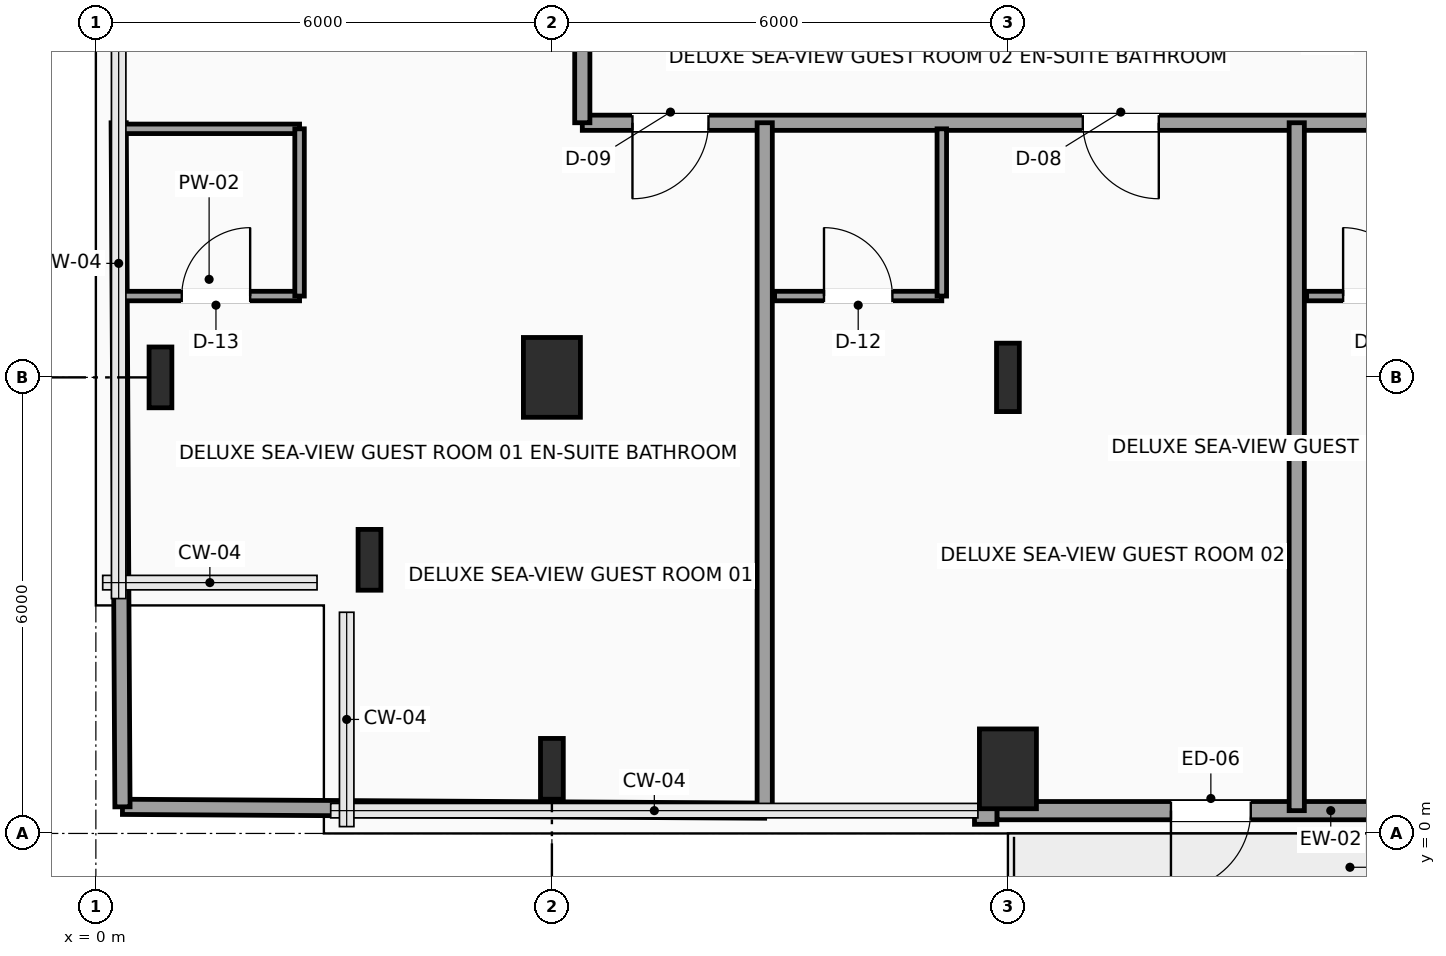
"""IFC4 building model, lengths in metres.
Left out: names, types, materials, properties, quantities, classifications, styles, units other than length and angle.
Written with IfcOpenShell. Run it as: python <this file> out.ifc"""

import sys

from ifc_helpers import new_model, si_unit, direction, frame, frame_2d, origin, origin_2d, place, context, subcontext, project, spatial, rectangle, i_section, extrude, element, fill, save


model = new_model("IFC4")
c1 = context("Model", 3, precision=1e-05, world=origin(), true_north=direction((0.0, 1.0)))
c2 = subcontext(c1, "Body", "Model", "MODEL_VIEW")
j1 = project(units=[si_unit("LENGTHUNIT", "METRE"), si_unit("PLANEANGLEUNIT", "RADIAN")], contexts=[c1])
p1 = place(None, origin())
s1 = spatial("IfcSite", under=j1, at=p1, CompositionType="ELEMENT")
p2 = place(p1, origin())
s2 = spatial("IfcBuilding", under=s1, at=p2, CompositionType="ELEMENT")
p3 = place(p2, frame((0.0, 0.0, 172.95)))
s3 = spatial("IfcBuildingStorey", under=s2, at=p3, CompositionType="ELEMENT", Elevation=172.95)
for number, where, z_axis, x_axis in (
    (1, (3.6, 3.6, 0.0), (0.0, 0.0, 1.0), (1.0, 0.0, 0.0)),
    (2, (0.85, 6.0, 0.0), (0.0, 0.0, 1.0), (1.0, 0.0, 0.0)),
    (3, (6.0, 0.85, 0.0), (0.0, 0.0, 1.0), (1.0, 0.0, 0.0)),
):
    element("IfcColumn", number, at=place(p3, frame(where, z_axis=z_axis, x_axis=x_axis)), inside=s3, PredefinedType="COLUMN", context=c2, shape_type="SweptSolid", body=[
        extrude(i_section(OverallWidth=0.3, OverallDepth=0.8, WebThickness=0.018, FlangeThickness=0.033, FilletRadius=0.03, at=origin_2d()), origin(), (0.0, 0.0, 1.0), 3.75),
    ])
for number, where, z_axis, x_axis in (
    (4, (6.0, 6.0, 0.0), (0.0, 0.0, 1.0), (1.0, 0.0, 0.0)),
    (5, (12.0, 0.85, 0.0), (0.0, 0.0, 1.0), (1.0, 0.0, 0.0)),
):
    element("IfcColumn", number, at=place(p3, frame(where, z_axis=z_axis, x_axis=x_axis)), inside=s3, PredefinedType="COLUMN", context=c2, shape_type="SweptSolid", body=[
        extrude(rectangle(XDim=0.75, YDim=1.05, at=origin_2d()), origin(), (0.0, 0.0, 1.0), 3.75),
    ])
p4 = place(p3, frame((12.0, 6.0, 0.0), z_axis=(0.0, 0.0, 1.0), x_axis=(1.0, 0.0, 0.0)))
e6 = element("IfcColumn", 6, at=p4, inside=s3, PredefinedType="COLUMN", context=c2, shape_type="SweptSolid", body=[
    extrude(i_section(OverallWidth=0.3, OverallDepth=0.9, WebThickness=0.019, FlangeThickness=0.035, FilletRadius=0.03, at=origin_2d()), origin(), (0.0, 0.0, 1.0), 3.75),
])
p5 = place(p3, frame((21.145, 0.3, 0.0), z_axis=(0.0, 0.0, 1.0), x_axis=(-1.0, 0.0, 0.0)))
e7 = element("IfcWall", 7, at=p5, inside=s3, PredefinedType="SOLIDWALL", context=c2, shape_type="SweptSolid", body=[
    extrude(rectangle(XDim=9.29, YDim=0.24, at=frame_2d((4.645, 0.0))), origin(), (0.0, 0.0, 1.0), 3.54),
])
p6 = place(p5, frame((5.95, 0.0, 0.0)))
e8 = element("IfcOpeningElement", 8, at=p6, cuts=e7, PredefinedType="OPENING", context=c2, shape_type="SweptSolid", body=[
    extrude(rectangle(XDim=1.05, YDim=2.2, at=frame_2d((0.525, 1.1))), frame((0.0, 0.13, 0.0), z_axis=(0.0, -1.0, 0.0), x_axis=(1.0, 0.0, 0.0)), (0.0, 0.0, 1.0), 0.26),
])
p7 = place(p5, frame((0.35, 0.0, 0.85)))
e9 = element("IfcOpeningElement", 9, at=p7, cuts=e7, PredefinedType="OPENING", context=c2, shape_type="SweptSolid", body=[
    extrude(rectangle(XDim=2.1, YDim=2.2, at=frame_2d((1.05, 1.1))), frame((0.0, 0.13, 0.0), z_axis=(0.0, -1.0, 0.0), x_axis=(1.0, 0.0, 0.0)), (0.0, 0.0, 1.0), 0.26),
])
p8 = place(p3, frame((11.855, 0.24, 0.0), z_axis=(0.0, 0.0, 1.0), x_axis=(-1.0, 0.0, 0.0)))
e10 = element("IfcWall", 10, at=p8, inside=s3, PredefinedType="SOLIDWALL", context=c2, shape_type="SweptSolid", body=[
    extrude(rectangle(XDim=0.295, YDim=0.24, at=frame_2d((0.147, 0.0))), origin(), (0.0, 0.0, 1.0), 3.54),
])
p9 = place(p3, frame((22.25, 9.35, 0.0), z_axis=(0.0, 0.0, 1.0), x_axis=(-1.0, 0.0, 0.0)))
e11 = element("IfcWall", 11, at=p9, inside=s3, PredefinedType="PARTITIONING", context=c2, shape_type="SweptSolid", body=[
    extrude(rectangle(XDim=15.85, YDim=0.2, at=frame_2d((7.925, 0.0))), origin(), (0.0, 0.0, 1.0), 3.54),
])
p10 = place(p9, frame((14.19, 0.0, 0.0)))
e12 = element("IfcOpeningElement", 12, at=p10, cuts=e11, PredefinedType="OPENING", context=c2, shape_type="SweptSolid", body=[
    extrude(rectangle(XDim=1.0, YDim=2.2, at=frame_2d((0.5, 1.1))), frame((0.0, 0.11, 0.0), z_axis=(0.0, -1.0, 0.0), x_axis=(1.0, 0.0, 0.0)), (0.0, 0.0, 1.0), 0.22),
])
p11 = place(p9, frame((8.265, 0.0, 0.0)))
e13 = element("IfcOpeningElement", 13, at=p11, cuts=e11, PredefinedType="OPENING", context=c2, shape_type="SweptSolid", body=[
    extrude(rectangle(XDim=1.0, YDim=2.2, at=frame_2d((0.5, 1.1))), frame((0.0, 0.11, 0.0), z_axis=(0.0, -1.0, 0.0), x_axis=(1.0, 0.0, 0.0)), (0.0, 0.0, 1.0), 0.22),
])
p12 = place(p9, frame((1.54, 0.0, 0.0)))
e14 = element("IfcOpeningElement", 14, at=p12, cuts=e11, PredefinedType="OPENING", context=c2, shape_type="SweptSolid", body=[
    extrude(rectangle(XDim=1.0, YDim=2.2, at=frame_2d((0.5, 1.1))), frame((0.0, 0.11, 0.0), z_axis=(0.0, -1.0, 0.0), x_axis=(1.0, 0.0, 0.0)), (0.0, 0.0, 1.0), 0.22),
])
p13 = place(p3, frame((6.4, 9.35, 0.0), z_axis=(0.0, 0.0, 1.0), x_axis=(0.0, 1.0, 0.0)))
e15 = element("IfcWall", 15, at=p13, inside=s3, PredefinedType="PARTITIONING", context=c2, shape_type="SweptSolid", body=[
    extrude(rectangle(XDim=1.7, YDim=0.2, at=frame_2d((0.85, 0.0))), origin(), (0.0, 0.0, 1.0), 3.54),
])
p14 = place(p3, frame((0.35, 0.35, 0.0), z_axis=(0.0, 0.0, 1.0), x_axis=(0.99998245966, -0.005922868574, 0.0)))
e16 = element("IfcWall", 16, at=p14, inside=s3, PredefinedType="PARTITIONING", context=c2, shape_type="SweptSolid", body=[
    extrude(rectangle(XDim=8.45, YDim=0.2, at=frame_2d((4.225, 0.0))), origin(), (0.0, 0.0, 1.0), 3.54),
])
p15 = place(p3, frame((0.35, 0.35, 0.0), z_axis=(0.0, 0.0, 1.0), x_axis=(-0.005560894919, 0.999984538104, 0.0)))
e17 = element("IfcWall", 17, at=p15, inside=s3, PredefinedType="PARTITIONING", context=c2, shape_type="SweptSolid", body=[
    extrude(rectangle(XDim=9.0, YDim=0.2, at=frame_2d((4.5, 0.0))), origin(), (0.0, 0.0, 1.0), 3.54),
])
p16 = place(p3, frame((8.8, 0.3, 0.0), z_axis=(0.0, 0.0, 1.0), x_axis=(0.0, 1.0, 0.0)))
e18 = element("IfcWall", 18, at=p16, inside=s3, PredefinedType="PARTITIONING", context=c2, shape_type="SweptSolid", body=[
    extrude(rectangle(XDim=9.05, YDim=0.2, at=frame_2d((4.525, 0.0))), origin(), (0.0, 0.0, 1.0), 3.54),
])
p17 = place(p3, frame((0.3, 7.07, 0.0), z_axis=(0.0, 0.0, 1.0), x_axis=(1.0, 0.0, 0.0)))
e19 = element("IfcWall", 19, at=p17, inside=s3, PredefinedType="PARTITIONING", context=c2, shape_type="SweptSolid", body=[
    extrude(rectangle(XDim=2.38, YDim=0.125, at=frame_2d((1.19, 0.0))), origin(), (0.0, 0.0, 1.0), 3.54),
])
p18 = place(p17, frame((0.83, 0.0, 0.0)))
e20 = element("IfcOpeningElement", 20, at=p18, cuts=e19, PredefinedType="OPENING", context=c2, shape_type="SweptSolid", body=[
    extrude(rectangle(XDim=0.9, YDim=2.1, at=frame_2d((0.45, 1.05))), frame((0.0, 0.073, 0.0), z_axis=(0.0, -1.0, 0.0), x_axis=(1.0, 0.0, 0.0)), (0.0, 0.0, 1.0), 0.145),
])
p19 = place(p3, frame((0.3, 9.27, 0.0), z_axis=(0.0, 0.0, 1.0), x_axis=(1.0, 0.0, 0.0)))
e21 = element("IfcWall", 21, at=p19, inside=s3, PredefinedType="PARTITIONING", context=c2, shape_type="SweptSolid", body=[
    extrude(rectangle(XDim=2.38, YDim=0.125, at=frame_2d((1.19, 0.0))), origin(), (0.0, 0.0, 1.0), 3.54),
])
p20 = place(p3, frame((2.68, 7.07, 0.0), z_axis=(0.0, 0.0, 1.0), x_axis=(0.0, 1.0, 0.0)))
e22 = element("IfcWall", 22, at=p20, inside=s3, PredefinedType="PARTITIONING", context=c2, shape_type="SweptSolid", body=[
    extrude(rectangle(XDim=2.2, YDim=0.125, at=frame_2d((1.1, 0.0))), origin(), (0.0, 0.0, 1.0), 3.54),
])
p21 = place(p3, frame((15.8, 0.3, 0.0), z_axis=(0.0, 0.0, 1.0), x_axis=(0.0, 1.0, 0.0)))
e23 = element("IfcWall", 23, at=p21, inside=s3, PredefinedType="PARTITIONING", context=c2, shape_type="SweptSolid", body=[
    extrude(rectangle(XDim=9.05, YDim=0.2, at=frame_2d((4.525, 0.0))), origin(), (0.0, 0.0, 1.0), 3.54),
])
p22 = place(p3, frame((8.93, 7.07, 0.0), z_axis=(0.0, 0.0, 1.0), x_axis=(1.0, 0.0, 0.0)))
e24 = element("IfcWall", 24, at=p22, inside=s3, PredefinedType="PARTITIONING", context=c2, shape_type="SweptSolid", body=[
    extrude(rectangle(XDim=2.2, YDim=0.125, at=frame_2d((1.1, 0.0))), origin(), (0.0, 0.0, 1.0), 3.54),
])
p23 = place(p22, frame((0.65, 0.0, 0.0)))
e25 = element("IfcOpeningElement", 25, at=p23, cuts=e24, PredefinedType="OPENING", context=c2, shape_type="SweptSolid", body=[
    extrude(rectangle(XDim=0.9, YDim=2.1, at=frame_2d((0.45, 1.05))), frame((0.0, 0.073, 0.0), z_axis=(0.0, -1.0, 0.0), x_axis=(1.0, 0.0, 0.0)), (0.0, 0.0, 1.0), 0.145),
])
p24 = place(p3, frame((11.13, 7.07, 0.0), z_axis=(0.0, 0.0, 1.0), x_axis=(0.0, 1.0, 0.0)))
e26 = element("IfcWall", 26, at=p24, inside=s3, PredefinedType="PARTITIONING", context=c2, shape_type="SweptSolid", body=[
    extrude(rectangle(XDim=2.2, YDim=0.125, at=frame_2d((1.1, 0.0))), origin(), (0.0, 0.0, 1.0), 3.54),
])
p25 = place(p3, frame((15.93, 7.07, 0.0), z_axis=(0.0, 0.0, 1.0), x_axis=(1.0, 0.0, 0.0)))
e27 = element("IfcWall", 27, at=p25, inside=s3, PredefinedType="PARTITIONING", context=c2, shape_type="SweptSolid", body=[
    extrude(rectangle(XDim=2.2, YDim=0.125, at=frame_2d((1.1, 0.0))), origin(), (0.0, 0.0, 1.0), 3.54),
])
p26 = place(p25, frame((0.48, 0.0, 0.0)))
e28 = element("IfcOpeningElement", 28, at=p26, cuts=e27, PredefinedType="OPENING", context=c2, shape_type="SweptSolid", body=[
    extrude(rectangle(XDim=0.9, YDim=2.1, at=frame_2d((0.45, 1.05))), frame((0.0, 0.073, 0.0), z_axis=(0.0, -1.0, 0.0), x_axis=(1.0, 0.0, 0.0)), (0.0, 0.0, 1.0), 0.145),
])
p27 = place(p6, origin())
e29 = element("IfcDoor", 29, at=p27, inside=s3, OperationType="SINGLE_SWING_RIGHT", PredefinedType="DOOR", context=c2, shape_type="SweptSolid", body=[
    extrude(rectangle(XDim=1.05, YDim=2.2, at=frame_2d((0.525, 1.1))), frame((0.0, 0.025, 0.0), z_axis=(0.0, -1.0, 0.0), x_axis=(1.0, 0.0, 0.0)), (0.0, 0.0, 1.0), 0.05),
])
fill(e8, e29)
p28 = place(p10, origin())
e30 = element("IfcDoor", 30, at=p28, inside=s3, OperationType="SINGLE_SWING_RIGHT", PredefinedType="DOOR", context=c2, shape_type="SweptSolid", body=[
    extrude(rectangle(XDim=1.0, YDim=2.2, at=frame_2d((0.5, 1.1))), frame((0.0, 0.025, 0.0), z_axis=(0.0, -1.0, 0.0), x_axis=(1.0, 0.0, 0.0)), (0.0, 0.0, 1.0), 0.05),
])
fill(e12, e30)
p29 = place(p11, origin())
e31 = element("IfcDoor", 31, at=p29, inside=s3, OperationType="SINGLE_SWING_LEFT", PredefinedType="DOOR", context=c2, shape_type="SweptSolid", body=[
    extrude(rectangle(XDim=1.0, YDim=2.2, at=frame_2d((0.5, 1.1))), frame((0.0, 0.025, 0.0), z_axis=(0.0, -1.0, 0.0), x_axis=(1.0, 0.0, 0.0)), (0.0, 0.0, 1.0), 0.05),
])
fill(e13, e31)
p30 = place(p18, origin())
e32 = element("IfcDoor", 32, at=p30, inside=s3, OperationType="SINGLE_SWING_RIGHT", PredefinedType="DOOR", context=c2, shape_type="SweptSolid", body=[
    extrude(rectangle(XDim=0.9, YDim=2.1, at=frame_2d((0.45, 1.05))), frame((0.0, 0.025, 0.0), z_axis=(0.0, -1.0, 0.0), x_axis=(1.0, 0.0, 0.0)), (0.0, 0.0, 1.0), 0.05),
])
fill(e20, e32)
p31 = place(p23, origin())
e33 = element("IfcDoor", 33, at=p31, inside=s3, OperationType="SINGLE_SWING_LEFT", PredefinedType="DOOR", context=c2, shape_type="SweptSolid", body=[
    extrude(rectangle(XDim=0.9, YDim=2.1, at=frame_2d((0.45, 1.05))), frame((0.0, 0.025, 0.0), z_axis=(0.0, -1.0, 0.0), x_axis=(1.0, 0.0, 0.0)), (0.0, 0.0, 1.0), 0.05),
])
fill(e25, e33)
p32 = place(p26, origin())
e34 = element("IfcDoor", 34, at=p32, inside=s3, OperationType="SINGLE_SWING_LEFT", PredefinedType="DOOR", context=c2, shape_type="SweptSolid", body=[
    extrude(rectangle(XDim=0.9, YDim=2.1, at=frame_2d((0.45, 1.05))), frame((0.0, 0.025, 0.0), z_axis=(0.0, -1.0, 0.0), x_axis=(1.0, 0.0, 0.0)), (0.0, 0.0, 1.0), 0.05),
])
fill(e28, e34)
save(model, sys.argv[1])
